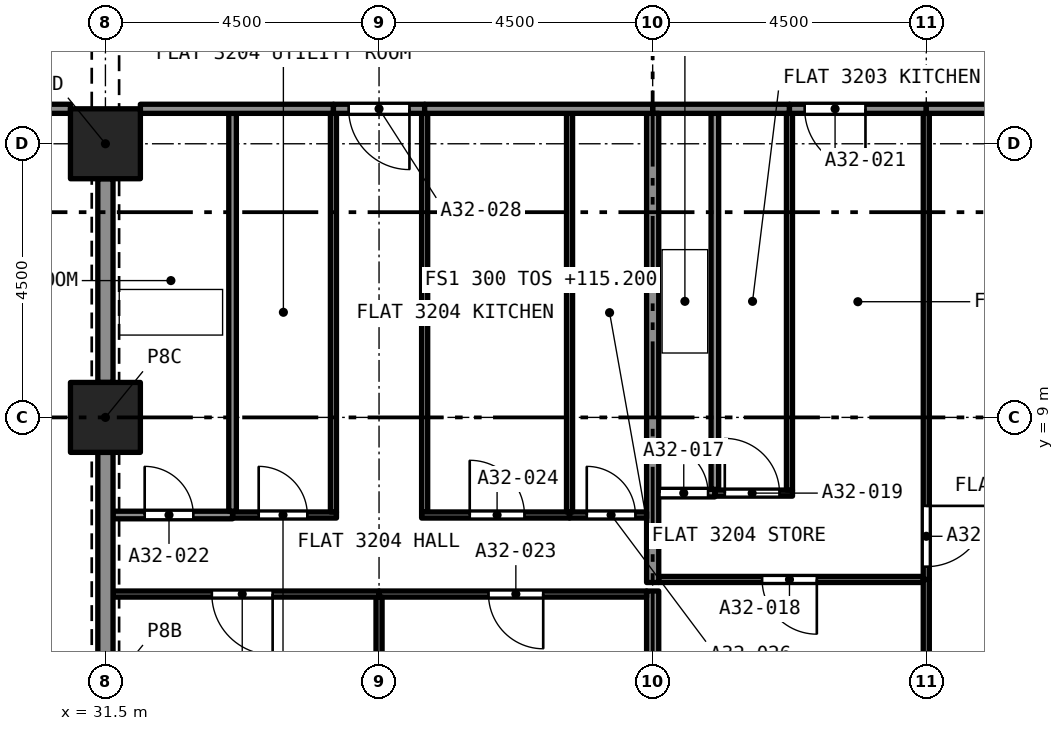
"""IFC4 building model, lengths in metres.
Left out: names, types, materials, properties, quantities, classifications, styles, units other than length and angle.
Written with IfcOpenShell. Run it as: python <this file> out.ifc"""

import sys

from ifc_helpers import new_model, si_unit, direction, frame, frame_2d, origin, origin_2d, place, context, subcontext, project, spatial, rectangle, extrude, element, fill, save


model = new_model("IFC4")
c1 = context("Model", 3, precision=1e-05, world=origin(), true_north=direction((0.0, 1.0)))
c2 = subcontext(c1, "Body", "Model", "MODEL_VIEW")
j1 = project(units=[si_unit("LENGTHUNIT", "METRE"), si_unit("PLANEANGLEUNIT", "RADIAN")], contexts=[c1])
p1 = place(None, origin())
s1 = spatial("IfcSite", under=j1, at=p1, CompositionType="ELEMENT")
p2 = place(p1, origin())
s2 = spatial("IfcBuilding", under=s1, at=p2, CompositionType="ELEMENT")
p3 = place(p2, frame((0.0, 0.0, 115.2)))
s3 = spatial("IfcBuildingStorey", under=s2, at=p3, CompositionType="ELEMENT", Elevation=115.2)
for number, where, z_axis, x_axis in (
    (1, (31.5, 9.0, 0.0), (0.0, 0.0, 1.0), (1.0, 0.0, 0.0)),
    (2, (31.5, 13.5, 0.0), (0.0, 0.0, 1.0), (1.0, 0.0, 0.0)),
):
    element("IfcColumn", number, at=place(p3, frame(where, z_axis=z_axis, x_axis=x_axis)), inside=s3, PredefinedType="COLUMN", context=c2, shape_type="SweptSolid", body=[
        extrude(rectangle(XDim=1.15, YDim=1.15, at=origin_2d()), origin(), (0.0, 0.0, 1.0), 3.2),
    ])
p4 = place(p3, frame((40.6, 7.755, 0.0), z_axis=(0.0, 0.0, 1.0), x_axis=(1.0, 0.0, 0.0)))
e3 = element("IfcWall", 3, at=p4, inside=s3, PredefinedType="PARTITIONING", context=c2, shape_type="SweptSolid", body=[
    extrude(rectangle(XDim=0.923, YDim=0.125, at=frame_2d((0.461, 0.0))), origin(), (0.0, 0.0, 1.0), 2.9),
])
p5 = place(p4, frame((0.011, 0.0, 0.0)))
e4 = element("IfcOpeningElement", 4, at=p5, cuts=e3, PredefinedType="OPENING", context=c2, shape_type="SweptSolid", body=[
    extrude(rectangle(XDim=0.8, YDim=2.1, at=frame_2d((0.4, 1.05))), frame((0.0, 0.073, 0.0), z_axis=(0.0, -1.0, 0.0), x_axis=(1.0, 0.0, 0.0)), (0.0, 0.0, 1.0), 0.145),
])
p6 = place(p3, frame((41.523, 7.817, 0.0), z_axis=(0.0, 0.0, 1.0), x_axis=(0.0, 1.0, 0.0)))
e5 = element("IfcWall", 5, at=p6, inside=s3, PredefinedType="PARTITIONING", context=c2, shape_type="SweptSolid", body=[
    extrude(rectangle(XDim=6.183, YDim=0.125, at=frame_2d((3.091, 0.0))), origin(), (0.0, 0.0, 1.0), 2.9),
])
p7 = place(p3, frame((40.5, 14.075, 0.0), z_axis=(0.0, 0.0, 1.0), x_axis=(1.0, 0.0, 0.0)))
e6 = element("IfcWall", 6, at=p7, inside=s3, PredefinedType="PARTITIONING", context=c2, shape_type="SweptSolid", body=[
    extrude(rectangle(XDim=2.25, YDim=0.15, at=frame_2d((1.125, 0.0))), origin(), (0.0, 0.0, 1.0), 2.9),
])
p8 = place(p3, frame((44.95, 6.335, 0.0), z_axis=(0.0, 0.0, 1.0), x_axis=(-1.0, 0.0, 0.0)))
e7 = element("IfcWall", 7, at=p8, inside=s3, PredefinedType="PARTITIONING", context=c2, shape_type="SweptSolid", body=[
    extrude(rectangle(XDim=4.35, YDim=0.1, at=frame_2d((2.175, 0.0))), origin(), (0.0, 0.0, 1.0), 2.9),
])
p9 = place(p8, frame((1.75, 0.0, 0.0)))
e8 = element("IfcOpeningElement", 8, at=p9, cuts=e7, PredefinedType="OPENING", context=c2, shape_type="SweptSolid", body=[
    extrude(rectangle(XDim=0.9, YDim=2.1, at=frame_2d((0.45, 1.05))), frame((0.0, 0.06, 0.0), z_axis=(0.0, -1.0, 0.0), x_axis=(1.0, 0.0, 0.0)), (0.0, 0.0, 1.0), 0.12),
])
p10 = place(p3, frame((45.0, 0.622, 0.0), z_axis=(0.0, 0.0, 1.0), x_axis=(0.0, 1.0, 0.0)))
e9 = element("IfcWall", 9, at=p10, inside=s3, PredefinedType="PARTITIONING", context=c2, shape_type="SweptSolid", body=[
    extrude(rectangle(XDim=5.713, YDim=0.1, at=frame_2d((2.856, 0.0))), origin(), (0.0, 0.0, 1.0), 2.9),
])
p11 = place(p3, frame((40.5, 0.575, 0.0), z_axis=(0.0, 0.0, 1.0), x_axis=(0.0, 1.0, 0.0)))
e10 = element("IfcWall", 10, at=p11, inside=s3, PredefinedType="PARTITIONING", context=c2, shape_type="SweptSolid", body=[
    extrude(rectangle(XDim=5.57, YDim=0.2, at=frame_2d((2.785, 0.0))), origin(), (0.0, 0.0, 1.0), 2.9),
])
p12 = place(p3, frame((41.523, 7.755, 0.0), z_axis=(0.0, 0.0, 1.0), x_axis=(1.0, 0.0, 0.0)))
e11 = element("IfcWall", 11, at=p12, inside=s3, PredefinedType="PARTITIONING", context=c2, shape_type="SweptSolid", body=[
    extrude(rectangle(XDim=1.277, YDim=0.1, at=frame_2d((0.639, 0.0))), origin(), (0.0, 0.0, 1.0), 2.9),
])
p13 = place(p12, frame((0.164, 0.0, 0.0)))
e12 = element("IfcOpeningElement", 12, at=p13, cuts=e11, PredefinedType="OPENING", context=c2, shape_type="SweptSolid", body=[
    extrude(rectangle(XDim=0.9, YDim=2.1, at=frame_2d((0.45, 1.05))), frame((0.0, 0.06, 0.0), z_axis=(0.0, -1.0, 0.0), x_axis=(1.0, 0.0, 0.0)), (0.0, 0.0, 1.0), 0.12),
])
p14 = place(p3, frame((42.75, 7.805, 0.0), z_axis=(0.0, 0.0, 1.0), x_axis=(0.0, 1.0, 0.0)))
e13 = element("IfcWall", 13, at=p14, inside=s3, PredefinedType="PARTITIONING", context=c2, shape_type="SweptSolid", body=[
    extrude(rectangle(XDim=6.195, YDim=0.1, at=frame_2d((3.098, 0.0))), origin(), (0.0, 0.0, 1.0), 2.9),
])
p15 = place(p3, frame((45.0, 14.0, 0.0), z_axis=(0.0, 0.0, 1.0), x_axis=(0.0, -1.0, 0.0)))
e14 = element("IfcWall", 14, at=p15, inside=s3, PredefinedType="PARTITIONING", context=c2, shape_type="SweptSolid", body=[
    extrude(rectangle(XDim=7.665, YDim=0.1, at=frame_2d((3.833, 0.0))), origin(), (0.0, 0.0, 1.0), 2.9),
])
p16 = place(p15, frame((6.455, 0.0, 0.0)))
e15 = element("IfcOpeningElement", 15, at=p16, cuts=e14, PredefinedType="OPENING", context=c2, shape_type="SweptSolid", body=[
    extrude(rectangle(XDim=1.0, YDim=2.1, at=frame_2d((0.5, 1.05))), frame((0.0, 0.06, 0.0), z_axis=(0.0, -1.0, 0.0), x_axis=(1.0, 0.0, 0.0)), (0.0, 0.0, 1.0), 0.12),
])
p17 = place(p3, frame((40.5, 6.285, 0.0), z_axis=(0.0, 0.0, 1.0), x_axis=(0.0, 1.0, 0.0)))
e16 = element("IfcWall", 16, at=p17, inside=s3, PredefinedType="PARTITIONING", context=c2, shape_type="SweptSolid", body=[
    extrude(rectangle(XDim=7.715, YDim=0.2, at=frame_2d((3.857, 0.0))), origin(), (0.0, 0.0, 1.0), 2.9),
])
p18 = place(p3, frame((45.0, 14.075, 0.0), z_axis=(0.0, 0.0, 1.0), x_axis=(-1.0, 0.0, 0.0)))
e17 = element("IfcWall", 17, at=p18, inside=s3, PredefinedType="PARTITIONING", context=c2, shape_type="SweptSolid", body=[
    extrude(rectangle(XDim=2.25, YDim=0.15, at=frame_2d((1.125, 0.0))), origin(), (0.0, 0.0, 1.0), 2.9),
])
p19 = place(p18, frame((1.0, 0.0, 0.0)))
e18 = element("IfcOpeningElement", 18, at=p19, cuts=e17, PredefinedType="OPENING", context=c2, shape_type="SweptSolid", body=[
    extrude(rectangle(XDim=1.0, YDim=2.1, at=frame_2d((0.5, 1.05))), frame((0.0, 0.085, 0.0), z_axis=(0.0, -1.0, 0.0), x_axis=(1.0, 0.0, 0.0)), (0.0, 0.0, 1.0), 0.17),
])
p20 = place(p3, frame((45.0, 14.075, 0.0), z_axis=(0.0, 0.0, 1.0), x_axis=(1.0, 0.0, 0.0)))
e19 = element("IfcWall", 19, at=p20, inside=s3, PredefinedType="PARTITIONING", context=c2, shape_type="SweptSolid", body=[
    extrude(rectangle(XDim=3.925, YDim=0.15, at=frame_2d((1.962, 0.0))), origin(), (0.0, 0.0, 1.0), 2.9),
])
p21 = place(p3, frame((31.625, 7.395, 0.0), z_axis=(0.0, 0.0, 1.0), x_axis=(1.0, 0.0, 0.0)))
e20 = element("IfcWall", 20, at=p21, inside=s3, PredefinedType="PARTITIONING", context=c2, shape_type="SweptSolid", body=[
    extrude(rectangle(XDim=1.966, YDim=0.125, at=frame_2d((0.983, 0.0))), origin(), (0.0, 0.0, 1.0), 2.9),
])
p22 = place(p21, frame((0.521, 0.0, 0.0)))
e21 = element("IfcOpeningElement", 21, at=p22, cuts=e20, PredefinedType="OPENING", context=c2, shape_type="SweptSolid", body=[
    extrude(rectangle(XDim=0.8, YDim=2.1, at=frame_2d((0.4, 1.05))), frame((0.0, 0.073, 0.0), z_axis=(0.0, -1.0, 0.0), x_axis=(1.0, 0.0, 0.0)), (0.0, 0.0, 1.0), 0.145),
])
p23 = place(p3, frame((33.591, 7.458, 0.0), z_axis=(0.0, 0.0, 1.0), x_axis=(0.0, 1.0, 0.0)))
e22 = element("IfcWall", 22, at=p23, inside=s3, PredefinedType="PARTITIONING", context=c2, shape_type="SweptSolid", body=[
    extrude(rectangle(XDim=6.542, YDim=0.125, at=frame_2d((3.271, 0.0))), origin(), (0.0, 0.0, 1.0), 2.9),
])
p24 = place(p3, frame((31.5, 9.575, 0.0), z_axis=(0.0, 0.0, 1.0), x_axis=(0.0, 1.0, 0.0)))
e23 = element("IfcWall", 23, at=p24, inside=s3, PredefinedType="PARTITIONING", context=c2, shape_type="SweptSolid", body=[
    extrude(rectangle(XDim=3.35, YDim=0.25, at=frame_2d((1.675, 0.0))), origin(), (0.0, 0.0, 1.0), 2.38),
])
p25 = place(p3, frame((32.075, 14.075, 0.0), z_axis=(0.0, 0.0, 1.0), x_axis=(1.0, 0.0, 0.0)))
e24 = element("IfcWall", 24, at=p25, inside=s3, PredefinedType="PARTITIONING", context=c2, shape_type="SweptSolid", body=[
    extrude(rectangle(XDim=3.175, YDim=0.15, at=frame_2d((1.587, 0.0))), origin(), (0.0, 0.0, 1.0), 2.9),
])
p26 = place(p3, frame((40.4, 6.095, 0.0), z_axis=(0.0, 0.0, 1.0), x_axis=(-1.0, 0.0, 0.0)))
e25 = element("IfcWall", 25, at=p26, inside=s3, PredefinedType="PARTITIONING", context=c2, shape_type="SweptSolid", body=[
    extrude(rectangle(XDim=4.4, YDim=0.1, at=frame_2d((2.2, 0.0))), origin(), (0.0, 0.0, 1.0), 2.9),
])
p27 = place(p26, frame((1.7, 0.0, 0.0)))
e26 = element("IfcOpeningElement", 26, at=p27, cuts=e25, PredefinedType="OPENING", context=c2, shape_type="SweptSolid", body=[
    extrude(rectangle(XDim=0.9, YDim=2.1, at=frame_2d((0.45, 1.05))), frame((0.0, 0.06, 0.0), z_axis=(0.0, -1.0, 0.0), x_axis=(1.0, 0.0, 0.0)), (0.0, 0.0, 1.0), 0.12),
])
p28 = place(p3, frame((36.0, 0.575, 0.0), z_axis=(0.0, 0.0, 1.0), x_axis=(0.0, 1.0, 0.0)))
e27 = element("IfcWall", 27, at=p28, inside=s3, PredefinedType="PARTITIONING", context=c2, shape_type="SweptSolid", body=[
    extrude(rectangle(XDim=5.47, YDim=0.1, at=frame_2d((2.735, 0.0))), origin(), (0.0, 0.0, 1.0), 2.9),
])
p29 = place(p3, frame((36.75, 7.445, 0.0), z_axis=(0.0, 0.0, 1.0), x_axis=(0.0, 1.0, 0.0)))
e28 = element("IfcWall", 28, at=p29, inside=s3, PredefinedType="PARTITIONING", context=c2, shape_type="SweptSolid", body=[
    extrude(rectangle(XDim=6.555, YDim=0.1, at=frame_2d((3.277, 0.0))), origin(), (0.0, 0.0, 1.0), 2.9),
])
p30 = place(p3, frame((36.7, 7.395, 0.0), z_axis=(0.0, 0.0, 1.0), x_axis=(1.0, 0.0, 0.0)))
e29 = element("IfcWall", 29, at=p30, inside=s3, PredefinedType="PARTITIONING", context=c2, shape_type="SweptSolid", body=[
    extrude(rectangle(XDim=2.433, YDim=0.1, at=frame_2d((1.216, 0.0))), origin(), (0.0, 0.0, 1.0), 2.9),
])
p31 = place(p30, frame((0.792, 0.0, 0.0)))
e30 = element("IfcOpeningElement", 30, at=p31, cuts=e29, PredefinedType="OPENING", context=c2, shape_type="SweptSolid", body=[
    extrude(rectangle(XDim=0.9, YDim=2.1, at=frame_2d((0.45, 1.05))), frame((0.0, 0.06, 0.0), z_axis=(0.0, -1.0, 0.0), x_axis=(1.0, 0.0, 0.0)), (0.0, 0.0, 1.0), 0.12),
])
p32 = place(p3, frame((36.0, 6.095, 0.0), z_axis=(0.0, 0.0, 1.0), x_axis=(-1.0, 0.0, 0.0)))
e31 = element("IfcWall", 31, at=p32, inside=s3, PredefinedType="PARTITIONING", context=c2, shape_type="SweptSolid", body=[
    extrude(rectangle(XDim=4.375, YDim=0.1, at=frame_2d((2.188, 0.0))), origin(), (0.0, 0.0, 1.0), 2.9),
])
p33 = place(p32, frame((1.75, 0.0, 0.0)))
e32 = element("IfcOpeningElement", 32, at=p33, cuts=e31, PredefinedType="OPENING", context=c2, shape_type="SweptSolid", body=[
    extrude(rectangle(XDim=1.0, YDim=2.1, at=frame_2d((0.5, 1.05))), frame((0.0, 0.06, 0.0), z_axis=(0.0, -1.0, 0.0), x_axis=(1.0, 0.0, 0.0)), (0.0, 0.0, 1.0), 0.12),
])
p34 = place(p3, frame((39.133, 7.395, 0.0), z_axis=(0.0, 0.0, 1.0), x_axis=(1.0, 0.0, 0.0)))
e33 = element("IfcWall", 33, at=p34, inside=s3, PredefinedType="PARTITIONING", context=c2, shape_type="SweptSolid", body=[
    extrude(rectangle(XDim=1.267, YDim=0.1, at=frame_2d((0.634, 0.0))), origin(), (0.0, 0.0, 1.0), 2.9),
])
p35 = place(p34, frame((0.284, 0.0, 0.0)))
e34 = element("IfcOpeningElement", 34, at=p35, cuts=e33, PredefinedType="OPENING", context=c2, shape_type="SweptSolid", body=[
    extrude(rectangle(XDim=0.8, YDim=2.1, at=frame_2d((0.4, 1.05))), frame((0.0, 0.06, 0.0), z_axis=(0.0, -1.0, 0.0), x_axis=(1.0, 0.0, 0.0)), (0.0, 0.0, 1.0), 0.12),
])
p36 = place(p3, frame((33.591, 7.395, 0.0), z_axis=(0.0, 0.0, 1.0), x_axis=(1.0, 0.0, 0.0)))
e35 = element("IfcWall", 35, at=p36, inside=s3, PredefinedType="PARTITIONING", context=c2, shape_type="SweptSolid", body=[
    extrude(rectangle(XDim=1.709, YDim=0.1, at=frame_2d((0.854, 0.0))), origin(), (0.0, 0.0, 1.0), 2.9),
])
p37 = place(p36, frame((0.429, 0.0, 0.0)))
e36 = element("IfcOpeningElement", 36, at=p37, cuts=e35, PredefinedType="OPENING", context=c2, shape_type="SweptSolid", body=[
    extrude(rectangle(XDim=0.8, YDim=2.1, at=frame_2d((0.4, 1.05))), frame((0.0, 0.06, 0.0), z_axis=(0.0, -1.0, 0.0), x_axis=(1.0, 0.0, 0.0)), (0.0, 0.0, 1.0), 0.12),
])
p38 = place(p3, frame((35.25, 7.445, 0.0), z_axis=(0.0, 0.0, 1.0), x_axis=(0.0, 1.0, 0.0)))
e37 = element("IfcWall", 37, at=p38, inside=s3, PredefinedType="PARTITIONING", context=c2, shape_type="SweptSolid", body=[
    extrude(rectangle(XDim=6.555, YDim=0.1, at=frame_2d((3.277, 0.0))), origin(), (0.0, 0.0, 1.0), 2.9),
])
p39 = place(p3, frame((36.75, 14.075, 0.0), z_axis=(0.0, 0.0, 1.0), x_axis=(-1.0, 0.0, 0.0)))
e38 = element("IfcWall", 38, at=p39, inside=s3, PredefinedType="PARTITIONING", context=c2, shape_type="SweptSolid", body=[
    extrude(rectangle(XDim=1.5, YDim=0.15, at=frame_2d((0.75, 0.0))), origin(), (0.0, 0.0, 1.0), 2.9),
])
p40 = place(p39, frame((0.25, 0.0, 0.0)))
e39 = element("IfcOpeningElement", 39, at=p40, cuts=e38, PredefinedType="OPENING", context=c2, shape_type="SweptSolid", body=[
    extrude(rectangle(XDim=1.0, YDim=2.1, at=frame_2d((0.5, 1.05))), frame((0.0, 0.085, 0.0), z_axis=(0.0, -1.0, 0.0), x_axis=(1.0, 0.0, 0.0)), (0.0, 0.0, 1.0), 0.17),
])
p41 = place(p3, frame((39.133, 7.445, 0.0), z_axis=(0.0, 0.0, 1.0), x_axis=(0.0, 1.0, 0.0)))
e40 = element("IfcWall", 40, at=p41, inside=s3, PredefinedType="PARTITIONING", context=c2, shape_type="SweptSolid", body=[
    extrude(rectangle(XDim=6.555, YDim=0.1, at=frame_2d((3.277, 0.0))), origin(), (0.0, 0.0, 1.0), 2.9),
])
p42 = place(p3, frame((36.75, 14.075, 0.0), z_axis=(0.0, 0.0, 1.0), x_axis=(1.0, 0.0, 0.0)))
e41 = element("IfcWall", 41, at=p42, inside=s3, PredefinedType="PARTITIONING", context=c2, shape_type="SweptSolid", body=[
    extrude(rectangle(XDim=3.75, YDim=0.15, at=frame_2d((1.875, 0.0))), origin(), (0.0, 0.0, 1.0), 2.9),
])
p43 = place(p3, frame((31.5, 5.075, 0.0), z_axis=(0.0, 0.0, 1.0), x_axis=(0.0, 1.0, 0.0)))
e42 = element("IfcWall", 42, at=p43, inside=s3, PredefinedType="PARTITIONING", context=c2, shape_type="SweptSolid", body=[
    extrude(rectangle(XDim=3.35, YDim=0.25, at=frame_2d((1.675, 0.0))), origin(), (0.0, 0.0, 1.0), 2.38),
])
p44 = place(p3, frame((30.925, 14.075, 0.0), z_axis=(0.0, 0.0, 1.0), x_axis=(-1.0, 0.0, 0.0)))
e43 = element("IfcWall", 43, at=p44, inside=s3, PredefinedType="PARTITIONING", context=c2, shape_type="SweptSolid", body=[
    extrude(rectangle(XDim=8.425, YDim=0.15, at=frame_2d((4.212, 0.0))), origin(), (0.0, 0.0, 1.0), 2.75),
])
p45 = place(p44, frame((3.425, 0.0, 0.0)))
e44 = element("IfcOpeningElement", 44, at=p45, cuts=e43, PredefinedType="OPENING", context=c2, shape_type="SweptSolid", body=[
    extrude(rectangle(XDim=1.0, YDim=2.1, at=frame_2d((0.5, 1.05))), frame((0.0, 0.085, 0.0), z_axis=(0.0, -1.0, 0.0), x_axis=(1.0, 0.0, 0.0)), (0.0, 0.0, 1.0), 0.17),
])
p46 = place(p5, origin())
e45 = element("IfcDoor", 45, at=p46, inside=s3, OperationType="SINGLE_SWING_LEFT", PredefinedType="DOOR", context=c2, shape_type="SweptSolid", body=[
    extrude(rectangle(XDim=0.8, YDim=2.1, at=frame_2d((0.4, 1.05))), frame((0.0, 0.025, 0.0), z_axis=(0.0, -1.0, 0.0), x_axis=(1.0, 0.0, 0.0)), (0.0, 0.0, 1.0), 0.05),
])
fill(e4, e45)
p47 = place(p9, origin())
e46 = element("IfcDoor", 46, at=p47, inside=s3, OperationType="SINGLE_SWING_RIGHT", PredefinedType="DOOR", context=c2, shape_type="SweptSolid", body=[
    extrude(rectangle(XDim=0.9, YDim=2.1, at=frame_2d((0.45, 1.05))), frame((0.0, 0.025, 0.0), z_axis=(0.0, -1.0, 0.0), x_axis=(1.0, 0.0, 0.0)), (0.0, 0.0, 1.0), 0.05),
])
fill(e8, e46)
p48 = place(p13, origin())
e47 = element("IfcDoor", 47, at=p48, inside=s3, OperationType="SINGLE_SWING_LEFT", PredefinedType="DOOR", context=c2, shape_type="SweptSolid", body=[
    extrude(rectangle(XDim=0.9, YDim=2.1, at=frame_2d((0.45, 1.05))), frame((0.0, 0.025, 0.0), z_axis=(0.0, -1.0, 0.0), x_axis=(1.0, 0.0, 0.0)), (0.0, 0.0, 1.0), 0.05),
])
fill(e12, e47)
p49 = place(p16, origin())
e48 = element("IfcDoor", 48, at=p49, inside=s3, OperationType="SINGLE_SWING_RIGHT", PredefinedType="DOOR", context=c2, shape_type="SweptSolid", body=[
    extrude(rectangle(XDim=1.0, YDim=2.1, at=frame_2d((0.5, 1.05))), frame((0.0, 0.025, 0.0), z_axis=(0.0, -1.0, 0.0), x_axis=(1.0, 0.0, 0.0)), (0.0, 0.0, 1.0), 0.05),
])
fill(e15, e48)
p50 = place(p19, origin())
e49 = element("IfcDoor", 49, at=p50, inside=s3, OperationType="SINGLE_SWING_RIGHT", PredefinedType="DOOR", context=c2, shape_type="SweptSolid", body=[
    extrude(rectangle(XDim=1.0, YDim=2.1, at=frame_2d((0.5, 1.05))), frame((0.0, 0.025, 0.0), z_axis=(0.0, -1.0, 0.0), x_axis=(1.0, 0.0, 0.0)), (0.0, 0.0, 1.0), 0.05),
])
fill(e18, e49)
p51 = place(p22, origin())
e50 = element("IfcDoor", 50, at=p51, inside=s3, OperationType="SINGLE_SWING_LEFT", PredefinedType="DOOR", context=c2, shape_type="SweptSolid", body=[
    extrude(rectangle(XDim=0.8, YDim=2.1, at=frame_2d((0.4, 1.05))), frame((0.0, 0.025, 0.0), z_axis=(0.0, -1.0, 0.0), x_axis=(1.0, 0.0, 0.0)), (0.0, 0.0, 1.0), 0.05),
])
fill(e21, e50)
p52 = place(p27, origin())
e51 = element("IfcDoor", 51, at=p52, inside=s3, OperationType="SINGLE_SWING_LEFT", PredefinedType="DOOR", context=c2, shape_type="SweptSolid", body=[
    extrude(rectangle(XDim=0.9, YDim=2.1, at=frame_2d((0.45, 1.05))), frame((0.0, 0.025, 0.0), z_axis=(0.0, -1.0, 0.0), x_axis=(1.0, 0.0, 0.0)), (0.0, 0.0, 1.0), 0.05),
])
fill(e26, e51)
p53 = place(p31, origin())
e52 = element("IfcDoor", 52, at=p53, inside=s3, OperationType="SINGLE_SWING_RIGHT", PredefinedType="DOOR", context=c2, shape_type="SweptSolid", body=[
    extrude(rectangle(XDim=0.9, YDim=2.1, at=frame_2d((0.45, 1.05))), frame((0.0, 0.025, 0.0), z_axis=(0.0, -1.0, 0.0), x_axis=(1.0, 0.0, 0.0)), (0.0, 0.0, 1.0), 0.05),
])
fill(e30, e52)
p54 = place(p33, origin())
e53 = element("IfcDoor", 53, at=p54, inside=s3, OperationType="SINGLE_SWING_RIGHT", PredefinedType="DOOR", context=c2, shape_type="SweptSolid", body=[
    extrude(rectangle(XDim=1.0, YDim=2.1, at=frame_2d((0.5, 1.05))), frame((0.0, 0.025, 0.0), z_axis=(0.0, -1.0, 0.0), x_axis=(1.0, 0.0, 0.0)), (0.0, 0.0, 1.0), 0.05),
])
fill(e32, e53)
p55 = place(p35, origin())
e54 = element("IfcDoor", 54, at=p55, inside=s3, OperationType="SINGLE_SWING_RIGHT", PredefinedType="DOOR", context=c2, shape_type="SweptSolid", body=[
    extrude(rectangle(XDim=0.8, YDim=2.1, at=frame_2d((0.4, 1.05))), frame((0.0, 0.025, 0.0), z_axis=(0.0, -1.0, 0.0), x_axis=(1.0, 0.0, 0.0)), (0.0, 0.0, 1.0), 0.05),
])
fill(e34, e54)
p56 = place(p37, origin())
e55 = element("IfcDoor", 55, at=p56, inside=s3, OperationType="SINGLE_SWING_LEFT", PredefinedType="DOOR", context=c2, shape_type="SweptSolid", body=[
    extrude(rectangle(XDim=0.8, YDim=2.1, at=frame_2d((0.4, 1.05))), frame((0.0, 0.025, 0.0), z_axis=(0.0, -1.0, 0.0), x_axis=(1.0, 0.0, 0.0)), (0.0, 0.0, 1.0), 0.05),
])
fill(e36, e55)
p57 = place(p40, origin())
e56 = element("IfcDoor", 56, at=p57, inside=s3, OperationType="SINGLE_SWING_RIGHT", PredefinedType="DOOR", context=c2, shape_type="SweptSolid", body=[
    extrude(rectangle(XDim=1.0, YDim=2.1, at=frame_2d((0.5, 1.05))), frame((0.0, 0.025, 0.0), z_axis=(0.0, -1.0, 0.0), x_axis=(1.0, 0.0, 0.0)), (0.0, 0.0, 1.0), 0.05),
])
fill(e39, e56)
save(model, sys.argv[1])
